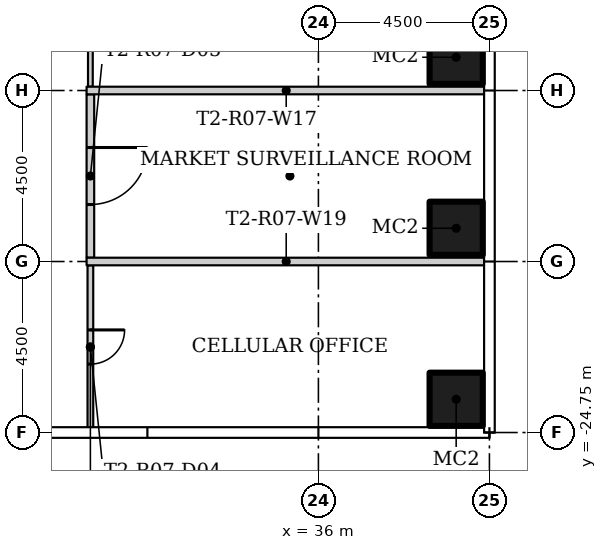
"""IFC4 building model, lengths in metres.
Left out: names, types, materials, properties, quantities, classifications, styles, units other than length and angle.
Written with IfcOpenShell. Run it as: python <this file> out.ifc"""

import sys

from ifc_helpers import new_model, si_unit, direction, frame, frame_2d, origin, origin_2d, place, context, subcontext, project, spatial, rectangle, hollow_rectangle, extrude, element, fill, save


model = new_model("IFC4")
c1 = context("Model", 3, precision=1e-05, world=origin(), true_north=direction((0.0, 1.0)))
c2 = subcontext(c1, "Body", "Model", "MODEL_VIEW")
j1 = project(units=[si_unit("LENGTHUNIT", "METRE"), si_unit("PLANEANGLEUNIT", "RADIAN")], contexts=[c1])
p1 = place(None, origin())
s1 = spatial("IfcSite", under=j1, at=p1, CompositionType="ELEMENT")
p2 = place(p1, origin())
s2 = spatial("IfcBuilding", under=s1, at=p2, CompositionType="ELEMENT")
p3 = place(p2, frame((0.0, 0.0, 69.3)))
s3 = spatial("IfcBuildingStorey", under=s2, at=p3, CompositionType="ELEMENT", Elevation=69.3)
for number, where in (
    (1, (39.625, -14.875, 0.0)),
    (2, (39.625, -19.375, 0.0)),
    (3, (39.625, -23.875, 0.0)),
):
    element("IfcColumn", number, at=place(p3, frame(where)), inside=s3, PredefinedType="COLUMN", context=c2, shape_type="SweptSolid", body=[
        extrude(hollow_rectangle(XDim=1.4, YDim=1.4, WallThickness=0.05, at=origin_2d()), origin(), (0.0, 0.0, 1.0), 3.55),
    ])
p4 = place(p3, frame((30.0, -15.85, 0.0), z_axis=(0.0, 0.0, 1.0), x_axis=(0.0, -1.0, 0.0)))
e4 = element("IfcWall", 4, at=p4, inside=s3, PredefinedType="PARTITIONING", context=c2, shape_type="SweptSolid", body=[
    extrude(rectangle(XDim=4.3, YDim=0.2, at=frame_2d((2.15, 0.0))), origin(), (0.0, 0.0, 1.0), 3.55),
])
p5 = place(p4, frame((1.4, 0.0, 0.0)))
e5 = element("IfcOpeningElement", 5, at=p5, cuts=e4, PredefinedType="OPENING", context=c2, shape_type="SweptSolid", body=[
    extrude(rectangle(XDim=1.5, YDim=2.1, at=frame_2d((0.75, 1.05))), frame((0.0, 0.11, 0.0), z_axis=(0.0, -1.0, 0.0), x_axis=(1.0, 0.0, 0.0)), (0.0, 0.0, 1.0), 0.22),
])
p6 = place(p3, frame((30.0, -20.35, 0.0), z_axis=(0.0, 0.0, 1.0), x_axis=(0.0, -1.0, 0.0)))
e6 = element("IfcWall", 6, at=p6, inside=s3, PredefinedType="PARTITIONING", context=c2, shape_type="SweptSolid", body=[
    extrude(rectangle(XDim=4.305, YDim=0.15, at=frame_2d((2.152, 0.0))), origin(), (0.0, 0.0, 1.0), 3.55),
])
p7 = place(p6, frame((1.7, 0.0, 0.0)))
e7 = element("IfcOpeningElement", 7, at=p7, cuts=e6, PredefinedType="OPENING", context=c2, shape_type="SweptSolid", body=[
    extrude(rectangle(XDim=0.9, YDim=2.1, at=frame_2d((0.45, 1.05))), frame((0.0, 0.085, 0.0), z_axis=(0.0, -1.0, 0.0), x_axis=(1.0, 0.0, 0.0)), (0.0, 0.0, 1.0), 0.17),
])
p8 = place(p3, frame((30.0, -6.825, 0.0), z_axis=(0.0, 0.0, 1.0), x_axis=(0.0, -1.0, 0.0)))
e8 = element("IfcWall", 8, at=p8, inside=s3, PredefinedType="PARTITIONING", context=c2, shape_type="SweptSolid", body=[
    extrude(rectangle(XDim=8.825, YDim=0.125, at=frame_2d((4.413, 0.0))), origin(), (0.0, 0.0, 1.0), 3.55),
])
p9 = place(p8, frame((3.675, 0.0, 0.0)))
e9 = element("IfcOpeningElement", 9, at=p9, cuts=e8, PredefinedType="OPENING", context=c2, shape_type="SweptSolid", body=[
    extrude(rectangle(XDim=1.5, YDim=2.1, at=frame_2d((0.75, 1.05))), frame((0.0, 0.073, 0.0), z_axis=(0.0, -1.0, 0.0), x_axis=(1.0, 0.0, 0.0)), (0.0, 0.0, 1.0), 0.145),
])
for number, where in (
    (10, (29.9, -15.75, 0.0)),
    (11, (29.9, -20.25, 0.0)),
):
    element("IfcWall", number, at=place(p3, frame(where)), inside=s3, PredefinedType="PARTITIONING", context=c2, shape_type="SweptSolid", body=[
        extrude(rectangle(XDim=10.505, YDim=0.2, at=frame_2d((5.252, 0.0))), origin(), (0.0, 0.0, 1.0), 3.55),
    ])
p10 = place(p7, origin())
e12 = element("IfcDoor", 12, at=p10, inside=s3, OperationType="SINGLE_SWING_RIGHT", PredefinedType="DOOR", context=c2, shape_type="SweptSolid", body=[
    extrude(rectangle(XDim=0.9, YDim=2.1, at=frame_2d((0.45, 1.05))), frame((0.0, 0.025, 0.0), z_axis=(0.0, -1.0, 0.0), x_axis=(1.0, 0.0, 0.0)), (0.0, 0.0, 1.0), 0.05),
])
fill(e7, e12)
p11 = place(p5, origin())
e13 = element("IfcDoor", 13, at=p11, inside=s3, OperationType="DOUBLE_DOOR_SINGLE_SWING", PredefinedType="DOOR", context=c2, shape_type="SweptSolid", body=[
    extrude(rectangle(XDim=1.5, YDim=2.1, at=frame_2d((0.75, 1.05))), frame((0.0, 0.025, 0.0), z_axis=(0.0, -1.0, 0.0), x_axis=(1.0, 0.0, 0.0)), (0.0, 0.0, 1.0), 0.05),
])
fill(e5, e13)
save(model, sys.argv[1])
